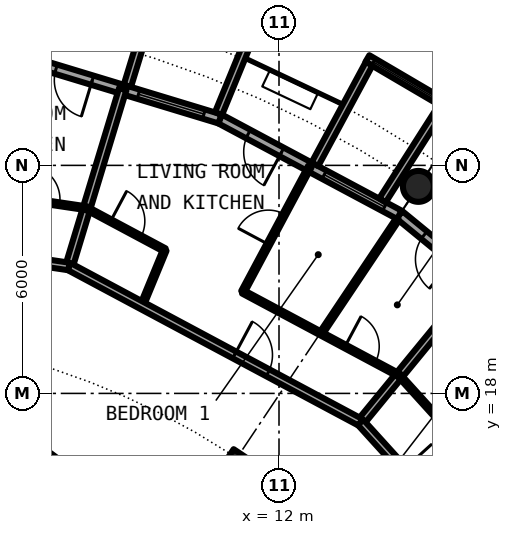
"""IFC4 building model, lengths in metres.
Left out: names, types, materials, properties, quantities, classifications, styles, units other than length and angle.
Written with IfcOpenShell. Run it as: python <this file> out.ifc"""

import sys

from ifc_helpers import new_model, si_unit, direction, frame, frame_2d, origin, origin_2d, place, context, subcontext, project, spatial, rectangle, circle, hollow_circle, i_section, extrude, element, fill, save


model = new_model("IFC4")
c1 = context("Model", 3, precision=1e-05, world=origin(), true_north=direction((0.0, 1.0)))
c2 = subcontext(c1, "Body", "Model", "MODEL_VIEW")
j1 = project(units=[si_unit("LENGTHUNIT", "METRE"), si_unit("PLANEANGLEUNIT", "RADIAN")], contexts=[c1])
p1 = place(None, origin())
s1 = spatial("IfcSite", under=j1, at=p1, CompositionType="ELEMENT")
p2 = place(p1, origin())
s2 = spatial("IfcBuilding", under=s1, at=p2, CompositionType="ELEMENT")
p3 = place(p2, frame((0.0, 0.0, 202.4)))
s3 = spatial("IfcBuildingStorey", under=s2, at=p3, CompositionType="ELEMENT", Elevation=202.4)
p4 = place(p3, frame((15.667, 23.448, 0.0), z_axis=(0.0, 0.0, 1.0), x_axis=(1.0, 0.0, 0.0)))
e1 = element("IfcColumn", 1, at=p4, inside=s3, PredefinedType="COLUMN", context=c2, shape_type="SweptSolid", body=[
    extrude(hollow_circle(Radius=0.406, WallThickness=0.03, at=origin_2d()), origin(), (0.0, 0.0, 1.0), 3.05),
])
p5 = place(p3, frame((10.889, 16.297, 0.0), z_axis=(0.0, 0.0, 1.0), x_axis=(0.55557023302, 0.831469612303, 0.0)))
e2 = element("IfcColumn", 2, at=p5, inside=s3, PredefinedType="COLUMN", context=c2, shape_type="SweptSolid", body=[
    extrude(i_section(OverallWidth=0.3, OverallDepth=0.4, WebThickness=0.013, FlangeThickness=0.024, FilletRadius=0.027, at=origin_2d()), origin(), (0.0, 0.0, 1.0), 3.05),
])
p6 = place(p3, frame((19.304, 19.304, 0.0), z_axis=(0.0, 0.0, 1.0), x_axis=(-0.773019449054, 0.634382322723, 0.0)))
e3 = element("IfcWall", 3, at=p6, inside=s3, PredefinedType="SOLIDWALL", context=c2, shape_type="SweptSolid", body=[
    extrude(rectangle(XDim=5.352, YDim=0.25, at=frame_2d((2.676, 0.0))), origin(), (0.0, 0.0, 1.0), 2.7),
])
p7 = place(p6, frame((0.441, 0.0, 0.3)))
e4 = element("IfcOpeningElement", 4, at=p7, cuts=e3, PredefinedType="OPENING", context=c2, shape_type="SweptSolid", body=[
    extrude(rectangle(XDim=1.8, YDim=2.1, at=frame_2d((0.9, 1.05))), frame((0.0, 0.135, 0.0), z_axis=(0.0, -1.0, 0.0), x_axis=(1.0, 0.0, 0.0)), (0.0, 0.0, 1.0), 0.27),
])
p8 = place(p6, frame((3.51, 0.0, 0.0)))
e5 = element("IfcOpeningElement", 5, at=p8, cuts=e3, PredefinedType="OPENING", context=c2, shape_type="SweptSolid", body=[
    extrude(rectangle(XDim=1.0, YDim=2.2, at=frame_2d((0.5, 1.1))), frame((0.0, 0.135, 0.0), z_axis=(0.0, -1.0, 0.0), x_axis=(1.0, 0.0, 0.0)), (0.0, 0.0, 1.0), 0.27),
])
p9 = place(p3, frame((15.167, 22.699, 0.0), z_axis=(0.0, 0.0, 1.0), x_axis=(-0.881915646801, 0.471407246368, 0.0)))
e6 = element("IfcWall", 6, at=p9, inside=s3, PredefinedType="SOLIDWALL", context=c2, shape_type="SweptSolid", body=[
    extrude(rectangle(XDim=5.352, YDim=0.25, at=frame_2d((2.676, 0.0))), origin(), (0.0, 0.0, 1.0), 2.7),
])
p10 = place(p9, frame((0.441, 0.0, 0.3)))
e7 = element("IfcOpeningElement", 7, at=p10, cuts=e6, PredefinedType="OPENING", context=c2, shape_type="SweptSolid", body=[
    extrude(rectangle(XDim=1.8, YDim=2.1, at=frame_2d((0.9, 1.05))), frame((0.0, 0.135, 0.0), z_axis=(0.0, -1.0, 0.0), x_axis=(1.0, 0.0, 0.0)), (0.0, 0.0, 1.0), 0.27),
])
p11 = place(p9, frame((3.51, 0.0, 0.0)))
e8 = element("IfcOpeningElement", 8, at=p11, cuts=e6, PredefinedType="OPENING", context=c2, shape_type="SweptSolid", body=[
    extrude(rectangle(XDim=1.0, YDim=2.2, at=frame_2d((0.5, 1.1))), frame((0.0, 0.135, 0.0), z_axis=(0.0, -1.0, 0.0), x_axis=(1.0, 0.0, 0.0)), (0.0, 0.0, 1.0), 0.27),
])
p12 = place(p3, frame((16.436, 25.574, -0.03), z_axis=(0.0, 0.0, 1.0), x_axis=(-0.862403467503, 0.506221551535, 0.0)))
e9 = element("IfcWall", 9, at=p12, inside=s3, PredefinedType="SOLIDWALL", context=c2, shape_type="SweptSolid", body=[
    extrude(rectangle(XDim=2.446, YDim=0.2, at=frame_2d((1.223, 0.0))), origin(), (0.0, 0.0, 1.0), 2.73),
])
p13 = place(p12, frame((0.183, 0.0, 0.33)))
e10 = element("IfcOpeningElement", 10, at=p13, cuts=e9, PredefinedType="OPENING", context=c2, shape_type="SweptSolid", body=[
    extrude(circle(Radius=1.04, at=frame_2d((1.04, 1.04))), frame((0.0, 0.11, 0.0), z_axis=(0.0, -1.0, 0.0), x_axis=(1.0, 0.0, 0.0)), (0.0, 0.0, 1.0), 0.22),
])
p14 = place(p3, frame((14.722, 23.079, -0.03), z_axis=(0.0, 0.0, 1.0), x_axis=(0.537572179146, 0.843217737129, 0.0)))
e11 = element("IfcWall", 11, at=p14, inside=s3, PredefinedType="SOLIDWALL", context=c2, shape_type="SweptSolid", body=[
    extrude(rectangle(XDim=2.924, YDim=0.2, at=frame_2d((1.462, 0.0))), origin(), (0.0, 0.0, 1.0), 2.73),
])
p15 = place(p3, frame((12.945, 24.029, -0.03), z_axis=(0.0, 0.0, 1.0), x_axis=(0.474424310775, 0.88029629861, 0.0)))
e12 = element("IfcWall", 12, at=p15, inside=s3, PredefinedType="SOLIDWALL", context=c2, shape_type="SweptSolid", body=[
    extrude(rectangle(XDim=3.006, YDim=0.2, at=frame_2d((1.503, 0.0))), origin(), (0.0, 0.0, 1.0), 2.73),
])
p16 = place(p3, frame((10.447, 25.222, 0.0), z_axis=(0.0, 0.0, 1.0), x_axis=(-0.956965678721, 0.290201119486, 0.0)))
e13 = element("IfcWall", 13, at=p16, inside=s3, PredefinedType="SOLIDWALL", context=c2, shape_type="SweptSolid", body=[
    extrude(rectangle(XDim=5.351, YDim=0.25, at=frame_2d((2.676, 0.0))), origin(), (0.0, 0.0, 1.0), 2.7),
])
p17 = place(p16, frame((0.441, 0.0, 0.3)))
e14 = element("IfcOpeningElement", 14, at=p17, cuts=e13, PredefinedType="OPENING", context=c2, shape_type="SweptSolid", body=[
    extrude(rectangle(XDim=1.8, YDim=2.1, at=frame_2d((0.9, 1.05))), frame((0.0, 0.135, 0.0), z_axis=(0.0, -1.0, 0.0), x_axis=(1.0, 0.0, 0.0)), (0.0, 0.0, 1.0), 0.27),
])
p18 = place(p16, frame((3.51, 0.0, 0.0)))
e15 = element("IfcOpeningElement", 15, at=p18, cuts=e13, PredefinedType="OPENING", context=c2, shape_type="SweptSolid", body=[
    extrude(rectangle(XDim=1.0, YDim=2.2, at=frame_2d((0.5, 1.1))), frame((0.0, 0.135, 0.0), z_axis=(0.0, -1.0, 0.0), x_axis=(1.0, 0.0, 0.0)), (0.0, 0.0, 1.0), 0.27),
])
p19 = place(p3, frame((10.409, 25.364, -0.03), z_axis=(0.0, 0.0, 1.0), x_axis=(0.379509886562, 0.925187681501, 0.0)))
e16 = element("IfcWall", 16, at=p19, inside=s3, PredefinedType="SOLIDWALL", context=c2, shape_type="SweptSolid", body=[
    extrude(rectangle(XDim=2.883, YDim=0.2, at=frame_2d((1.441, 0.0))), origin(), (0.0, 0.0, 1.0), 2.73),
])
p20 = place(p3, frame((8.009, 26.092, -0.03), z_axis=(0.0, 0.0, 1.0), x_axis=(0.293406695073, 0.955987715029, 0.0)))
e17 = element("IfcWall", 17, at=p20, inside=s3, PredefinedType="SOLIDWALL", context=c2, shape_type="SweptSolid", body=[
    extrude(rectangle(XDim=3.006, YDim=0.2, at=frame_2d((1.503, 0.0))), origin(), (0.0, 0.0, 1.0), 2.73),
])
p21 = place(p3, frame((6.474, 21.34, 0.0), z_axis=(0.0, 0.0, 1.0), x_axis=(0.290053269332, 0.957010502006, 0.0)))
e18 = element("IfcWall", 18, at=p21, inside=s3, PredefinedType="PARTITIONING", context=c2, shape_type="SweptSolid", body=[
    extrude(rectangle(XDim=4.874, YDim=0.2, at=frame_2d((2.437, 0.0))), origin(), (0.0, 0.0, 1.0), 2.7),
])
p22 = place(p3, frame((8.392, 20.314, 0.0), z_axis=(0.0, 0.0, 1.0), x_axis=(0.381535938362, 0.924354005638, 0.0)))
e19 = element("IfcWall", 19, at=p22, inside=s3, PredefinedType="PARTITIONING", context=c2, shape_type="SweptSolid", body=[
    extrude(rectangle(XDim=1.577, YDim=0.1, at=frame_2d((0.789, 0.0))), origin(), (0.0, 0.0, 1.0), 2.7),
])
p23 = place(p3, frame((11.05, 20.673, 0.0), z_axis=(0.0, 0.0, 1.0), x_axis=(0.471372010014, 0.881934480659, 0.0)))
e20 = element("IfcWall", 20, at=p23, inside=s3, PredefinedType="PARTITIONING", context=c2, shape_type="SweptSolid", body=[
    extrude(rectangle(XDim=3.734, YDim=0.1, at=frame_2d((1.867, 0.0))), origin(), (0.0, 0.0, 1.0), 2.7),
])
p24 = place(p23, frame((1.417, 0.0, 0.0)))
e21 = element("IfcOpeningElement", 21, at=p24, cuts=e20, PredefinedType="OPENING", context=c2, shape_type="SweptSolid", body=[
    extrude(rectangle(XDim=0.9, YDim=2.3, at=frame_2d((0.45, 1.15))), frame((0.0, 0.06, 0.0), z_axis=(0.0, -1.0, 0.0), x_axis=(1.0, 0.0, 0.0)), (0.0, 0.0, 1.0), 0.12),
])
p25 = place(p3, frame((13.106, 19.574, 0.0), z_axis=(0.0, 0.0, 1.0), x_axis=(0.556271723484, 0.831000463088, 0.0)))
e22 = element("IfcWall", 22, at=p25, inside=s3, PredefinedType="PARTITIONING", context=c2, shape_type="SweptSolid", body=[
    extrude(rectangle(XDim=3.619, YDim=0.1, at=frame_2d((1.809, 0.0))), origin(), (0.0, 0.0, 1.0), 2.7),
])
p26 = place(p3, frame((14.147, 17.238, 0.0), z_axis=(0.0, 0.0, 1.0), x_axis=(0.634374159378, 0.773026148273, 0.0)))
e23 = element("IfcWall", 23, at=p26, inside=s3, PredefinedType="PARTITIONING", context=c2, shape_type="SweptSolid", body=[
    extrude(rectangle(XDim=4.876, YDim=0.2, at=frame_2d((2.438, 0.0))), origin(), (0.0, 0.0, 1.0), 2.7),
])
p27 = place(p3, frame((5.137, 16.938, 0.0), z_axis=(0.0, 0.0, 1.0), x_axis=(0.803229232922, -0.595670042371, 0.0)))
e24 = element("IfcWall", 24, at=p27, inside=s3, PredefinedType="PARTITIONING", context=c2, shape_type="SweptSolid", body=[
    extrude(rectangle(XDim=10.224, YDim=0.2, at=frame_2d((5.112, 0.0))), origin(), (0.0, 0.0, 1.0), 2.7),
])
p28 = place(p27, frame((4.612, 0.0, 0.0)))
e25 = element("IfcOpeningElement", 25, at=p28, cuts=e24, PredefinedType="OPENING", context=c2, shape_type="SweptSolid", body=[
    extrude(rectangle(XDim=1.0, YDim=2.3, at=frame_2d((0.5, 1.15))), frame((0.0, 0.11, 0.0), z_axis=(0.0, -1.0, 0.0), x_axis=(1.0, 0.0, 0.0)), (0.0, 0.0, 1.0), 0.22),
])
p29 = place(p3, frame((6.473, 21.34, 0.0), z_axis=(0.0, 0.0, 1.0), x_axis=(0.881869539497, -0.471493494448, 0.0)))
e26 = element("IfcWall", 26, at=p29, inside=s3, PredefinedType="PARTITIONING", context=c2, shape_type="SweptSolid", body=[
    extrude(rectangle(XDim=8.704, YDim=0.2, at=frame_2d((4.352, 0.0))), origin(), (0.0, 0.0, 1.0), 2.7),
])
p30 = place(p29, frame((4.939, 0.0, 0.0)))
e27 = element("IfcOpeningElement", 27, at=p30, cuts=e26, PredefinedType="OPENING", context=c2, shape_type="SweptSolid", body=[
    extrude(rectangle(XDim=1.0, YDim=2.3, at=frame_2d((0.5, 1.15))), frame((0.0, 0.11, 0.0), z_axis=(0.0, -1.0, 0.0), x_axis=(1.0, 0.0, 0.0)), (0.0, 0.0, 1.0), 0.22),
])
p31 = place(p3, frame((0.0, 22.3, 0.0), z_axis=(0.0, 0.0, 1.0), x_axis=(0.989181015112, -0.146700100005, 0.0)))
e28 = element("IfcWall", 28, at=p31, inside=s3, PredefinedType="PARTITIONING", context=c2, shape_type="SweptSolid", body=[
    extrude(rectangle(XDim=6.544, YDim=0.2, at=frame_2d((3.272, 0.0))), origin(), (0.0, 0.0, 1.0), 2.7),
])
p32 = place(p31, frame((1.682, 0.0, 0.0)))
e29 = element("IfcOpeningElement", 29, at=p32, cuts=e28, PredefinedType="OPENING", context=c2, shape_type="SweptSolid", body=[
    extrude(rectangle(XDim=1.0, YDim=2.3, at=frame_2d((0.5, 1.15))), frame((0.0, 0.11, 0.0), z_axis=(0.0, -1.0, 0.0), x_axis=(1.0, 0.0, 0.0)), (0.0, 0.0, 1.0), 0.22),
])
p33 = place(p3, frame((14.147, 17.238, 0.0), z_axis=(0.0, 0.0, 1.0), x_axis=(0.671561669125, -0.740948665268, 0.0)))
e30 = element("IfcWall", 30, at=p33, inside=s3, PredefinedType="PARTITIONING", context=c2, shape_type="SweptSolid", body=[
    extrude(rectangle(XDim=6.544, YDim=0.2, at=frame_2d((3.272, 0.0))), origin(), (0.0, 0.0, 1.0), 2.7),
])
p34 = place(p33, frame((1.682, 0.0, 0.0)))
e31 = element("IfcOpeningElement", 31, at=p34, cuts=e30, PredefinedType="OPENING", context=c2, shape_type="SweptSolid", body=[
    extrude(rectangle(XDim=1.0, YDim=2.3, at=frame_2d((0.5, 1.15))), frame((0.0, 0.11, 0.0), z_axis=(0.0, -1.0, 0.0), x_axis=(1.0, 0.0, 0.0)), (0.0, 0.0, 1.0), 0.22),
])
p35 = place(p3, frame((6.938, 22.871, 0.0), z_axis=(0.0, 0.0, 1.0), x_axis=(0.881882873346, -0.471468554305, 0.0)))
e32 = element("IfcWall", 32, at=p35, inside=s3, PredefinedType="PARTITIONING", context=c2, shape_type="SweptSolid", body=[
    extrude(rectangle(XDim=2.331, YDim=0.1, at=frame_2d((1.166, 0.0))), origin(), (0.0, 0.0, 1.0), 2.7),
])
p36 = place(p35, frame((0.716, 0.0, 0.0)))
e33 = element("IfcOpeningElement", 33, at=p36, cuts=e32, PredefinedType="OPENING", context=c2, shape_type="SweptSolid", body=[
    extrude(rectangle(XDim=0.9, YDim=2.3, at=frame_2d((0.45, 1.15))), frame((0.0, 0.06, 0.0), z_axis=(0.0, -1.0, 0.0), x_axis=(1.0, 0.0, 0.0)), (0.0, 0.0, 1.0), 0.12),
])
p37 = place(p3, frame((11.05, 20.673, 0.0), z_axis=(0.0, 0.0, 1.0), x_axis=(0.881916280728, -0.471406060405, 0.0)))
e34 = element("IfcWall", 34, at=p37, inside=s3, PredefinedType="PARTITIONING", context=c2, shape_type="SweptSolid", body=[
    extrude(rectangle(XDim=4.663, YDim=0.1, at=frame_2d((2.331, 0.0))), origin(), (0.0, 0.0, 1.0), 2.7),
])
p38 = place(p37, frame((3.047, 0.0, 0.0)))
e35 = element("IfcOpeningElement", 35, at=p38, cuts=e34, PredefinedType="OPENING", context=c2, shape_type="SweptSolid", body=[
    extrude(rectangle(XDim=0.9, YDim=2.3, at=frame_2d((0.45, 1.15))), frame((0.0, 0.06, 0.0), z_axis=(0.0, -1.0, 0.0), x_axis=(1.0, 0.0, 0.0)), (0.0, 0.0, 1.0), 0.12),
])
p39 = place(p3, frame((4.625, 23.214, 0.0), z_axis=(0.0, 0.0, 1.0), x_axis=(0.989181588285, -0.146696235121, 0.0)))
e36 = element("IfcWall", 36, at=p39, inside=s3, PredefinedType="PARTITIONING", context=c2, shape_type="SweptSolid", body=[
    extrude(rectangle(XDim=2.338, YDim=0.1, at=frame_2d((1.169, 0.0))), origin(), (0.0, 0.0, 1.0), 2.7),
])
p40 = place(p39, frame((0.719, 0.0, 0.0)))
e37 = element("IfcOpeningElement", 37, at=p40, cuts=e36, PredefinedType="OPENING", context=c2, shape_type="SweptSolid", body=[
    extrude(rectangle(XDim=0.9, YDim=2.3, at=frame_2d((0.45, 1.15))), frame((0.0, 0.06, 0.0), z_axis=(0.0, -1.0, 0.0), x_axis=(1.0, 0.0, 0.0)), (0.0, 0.0, 1.0), 0.12),
])
p41 = place(p3, frame((15.162, 18.475, 0.0), z_axis=(0.0, 0.0, 1.0), x_axis=(0.671528384412, -0.740978831634, 0.0)))
e38 = element("IfcWall", 38, at=p41, inside=s3, PredefinedType="PARTITIONING", context=c2, shape_type="SweptSolid", body=[
    extrude(rectangle(XDim=2.338, YDim=0.1, at=frame_2d((1.169, 0.0))), origin(), (0.0, 0.0, 1.0), 2.7),
])
p42 = place(p8, origin())
e39 = element("IfcDoor", 39, at=p42, inside=s3, OperationType="SINGLE_SWING_LEFT", PredefinedType="DOOR", context=c2, shape_type="SweptSolid", body=[
    extrude(rectangle(XDim=1.0, YDim=2.2, at=frame_2d((0.5, 1.1))), frame((0.0, 0.025, 0.0), z_axis=(0.0, -1.0, 0.0), x_axis=(1.0, 0.0, 0.0)), (0.0, 0.0, 1.0), 0.05),
])
fill(e5, e39)
p43 = place(p10, origin())
e40 = element("IfcWindow", 40, at=p43, inside=s3, PartitioningType="SINGLE_PANEL", PredefinedType="WINDOW", context=c2, shape_type="SweptSolid", body=[
    extrude(rectangle(XDim=1.8, YDim=2.1, at=frame_2d((0.9, 1.05))), frame((0.0, 0.03, 0.0), z_axis=(0.0, -1.0, 0.0), x_axis=(1.0, 0.0, 0.0)), (0.0, 0.0, 1.0), 0.06),
])
fill(e7, e40)
p44 = place(p13, origin())
e41 = element("IfcWindow", 41, at=p44, inside=s3, PartitioningType="SINGLE_PANEL", PredefinedType="WINDOW", context=c2, shape_type="SweptSolid", body=[
    extrude(circle(Radius=1.04, at=frame_2d((1.04, 1.04))), frame((0.0, 0.03, 0.0), z_axis=(0.0, -1.0, 0.0), x_axis=(1.0, 0.0, 0.0)), (0.0, 0.0, 1.0), 0.06),
])
fill(e10, e41)
p45 = place(p11, origin())
e42 = element("IfcDoor", 42, at=p45, inside=s3, OperationType="SINGLE_SWING_LEFT", PredefinedType="DOOR", context=c2, shape_type="SweptSolid", body=[
    extrude(rectangle(XDim=1.0, YDim=2.2, at=frame_2d((0.5, 1.1))), frame((0.0, 0.025, 0.0), z_axis=(0.0, -1.0, 0.0), x_axis=(1.0, 0.0, 0.0)), (0.0, 0.0, 1.0), 0.05),
])
fill(e8, e42)
p46 = place(p17, origin())
e43 = element("IfcWindow", 43, at=p46, inside=s3, PartitioningType="SINGLE_PANEL", PredefinedType="WINDOW", context=c2, shape_type="SweptSolid", body=[
    extrude(rectangle(XDim=1.8, YDim=2.1, at=frame_2d((0.9, 1.05))), frame((0.0, 0.03, 0.0), z_axis=(0.0, -1.0, 0.0), x_axis=(1.0, 0.0, 0.0)), (0.0, 0.0, 1.0), 0.06),
])
fill(e14, e43)
p47 = place(p18, origin())
e44 = element("IfcDoor", 44, at=p47, inside=s3, OperationType="SINGLE_SWING_LEFT", PredefinedType="DOOR", context=c2, shape_type="SweptSolid", body=[
    extrude(rectangle(XDim=1.0, YDim=2.2, at=frame_2d((0.5, 1.1))), frame((0.0, 0.025, 0.0), z_axis=(0.0, -1.0, 0.0), x_axis=(1.0, 0.0, 0.0)), (0.0, 0.0, 1.0), 0.05),
])
fill(e15, e44)
p48 = place(p30, origin())
e45 = element("IfcDoor", 45, at=p48, inside=s3, OperationType="SINGLE_SWING_RIGHT", PredefinedType="DOOR", context=c2, shape_type="SweptSolid", body=[
    extrude(rectangle(XDim=1.0, YDim=2.3, at=frame_2d((0.5, 1.15))), frame((0.0, 0.025, 0.0), z_axis=(0.0, -1.0, 0.0), x_axis=(1.0, 0.0, 0.0)), (0.0, 0.0, 1.0), 0.05),
])
fill(e27, e45)
p49 = place(p36, origin())
e46 = element("IfcDoor", 46, at=p49, inside=s3, OperationType="SINGLE_SWING_RIGHT", PredefinedType="DOOR", context=c2, shape_type="SweptSolid", body=[
    extrude(rectangle(XDim=0.9, YDim=2.3, at=frame_2d((0.45, 1.15))), frame((0.0, 0.025, 0.0), z_axis=(0.0, -1.0, 0.0), x_axis=(1.0, 0.0, 0.0)), (0.0, 0.0, 1.0), 0.05),
])
fill(e33, e46)
p50 = place(p24, origin())
e47 = element("IfcDoor", 47, at=p50, inside=s3, OperationType="SINGLE_SWING_LEFT", PredefinedType="DOOR", context=c2, shape_type="SweptSolid", body=[
    extrude(rectangle(XDim=0.9, YDim=2.3, at=frame_2d((0.45, 1.15))), frame((0.0, 0.025, 0.0), z_axis=(0.0, -1.0, 0.0), x_axis=(1.0, 0.0, 0.0)), (0.0, 0.0, 1.0), 0.05),
])
fill(e21, e47)
p51 = place(p38, origin())
e48 = element("IfcDoor", 48, at=p51, inside=s3, OperationType="SINGLE_SWING_RIGHT", PredefinedType="DOOR", context=c2, shape_type="SweptSolid", body=[
    extrude(rectangle(XDim=0.9, YDim=2.3, at=frame_2d((0.45, 1.15))), frame((0.0, 0.025, 0.0), z_axis=(0.0, -1.0, 0.0), x_axis=(1.0, 0.0, 0.0)), (0.0, 0.0, 1.0), 0.05),
])
fill(e35, e48)
p52 = place(p40, origin())
e49 = element("IfcDoor", 49, at=p52, inside=s3, OperationType="SINGLE_SWING_RIGHT", PredefinedType="DOOR", context=c2, shape_type="SweptSolid", body=[
    extrude(rectangle(XDim=0.9, YDim=2.3, at=frame_2d((0.45, 1.15))), frame((0.0, 0.025, 0.0), z_axis=(0.0, -1.0, 0.0), x_axis=(1.0, 0.0, 0.0)), (0.0, 0.0, 1.0), 0.05),
])
fill(e37, e49)
save(model, sys.argv[1])
